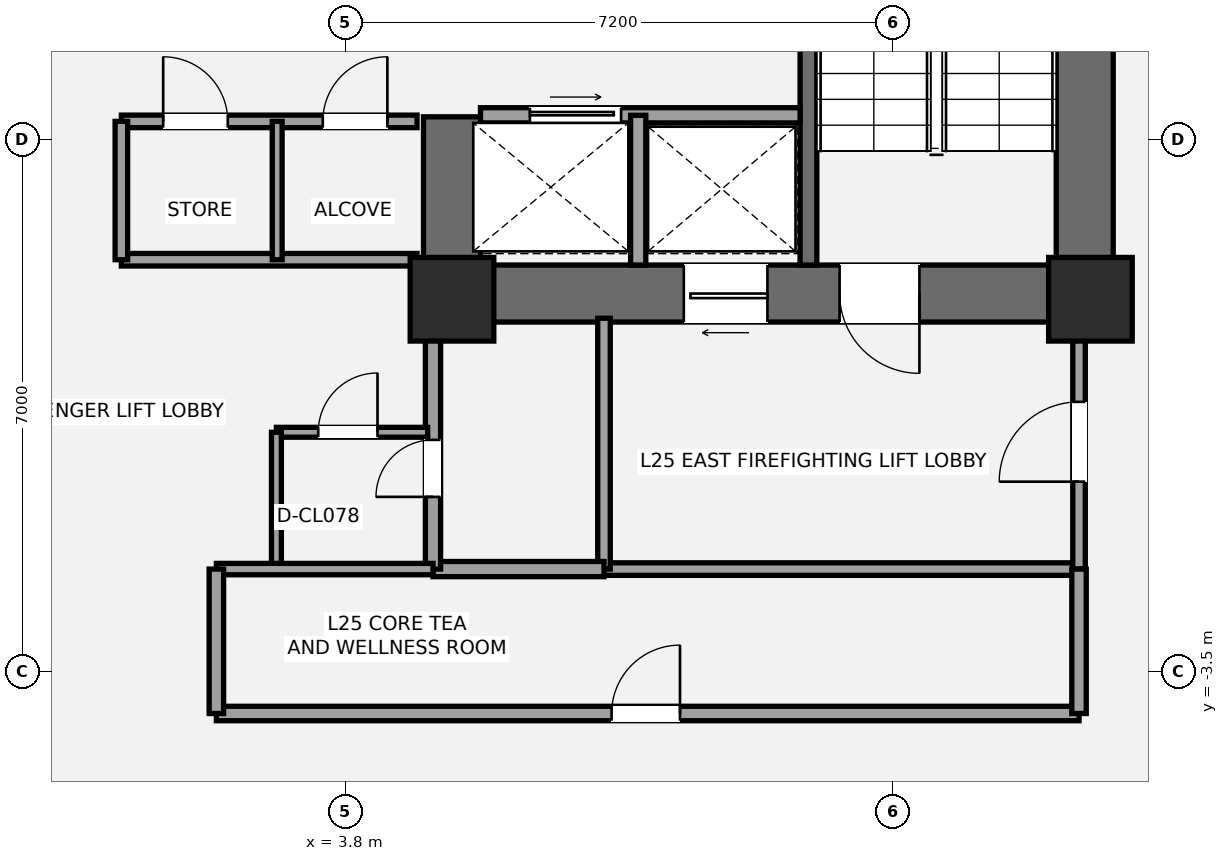
"""IFC4 building model, lengths in metres.
Left out: names, types, materials, properties, quantities, classifications, styles, units other than length and angle.
Written with IfcOpenShell. Run it as: python <this file> out.ifc"""

import sys

from ifc_helpers import new_model, si_unit, direction, frame, frame_2d, origin, origin_2d, place, context, subcontext, project, spatial, rectangle, extrude, element, fill, save


model = new_model("IFC4")
c1 = context("Model", 3, precision=1e-05, world=origin(), true_north=direction((0.0, 1.0)))
c2 = subcontext(c1, "Body", "Model", "MODEL_VIEW")
j1 = project(units=[si_unit("LENGTHUNIT", "METRE"), si_unit("PLANEANGLEUNIT", "RADIAN")], contexts=[c1])
p1 = place(None, origin())
s1 = spatial("IfcSite", under=j1, at=p1, CompositionType="ELEMENT")
p2 = place(p1, origin())
s2 = spatial("IfcBuilding", under=s1, at=p2, CompositionType="ELEMENT")
p3 = place(p2, frame((0.0, 0.0, 96.6)))
s3 = spatial("IfcBuildingStorey", under=s2, at=p3, CompositionType="ELEMENT", Elevation=96.6)
p4 = place(p3, frame((13.525, 1.1, 0.0), z_axis=(0.0, 0.0, 1.0), x_axis=(0.0, 1.0, 0.0)))
e1 = element("IfcWall", 1, at=p4, inside=s3, PredefinedType="SHEAR", context=c2, shape_type="SweptSolid", body=[
    extrude(rectangle(XDim=8.65, YDim=0.75, at=frame_2d((4.325, 0.0))), origin(), (0.0, 0.0, 1.0), 3.5),
])
p5 = place(p3, frame((13.9, 1.475, 0.0), z_axis=(0.0, 0.0, 1.0), x_axis=(-1.0, 0.0, 0.0)))
e2 = element("IfcWall", 2, at=p5, inside=s3, PredefinedType="SHEAR", context=c2, shape_type="SweptSolid", body=[
    extrude(rectangle(XDim=9.075, YDim=0.75, at=frame_2d((4.538, 0.0))), origin(), (0.0, 0.0, 1.0), 3.5),
])
p6 = place(p5, frame((2.55, 0.0, 0.0)))
e3 = element("IfcOpeningElement", 3, at=p6, cuts=e2, PredefinedType="OPENING", context=c2, shape_type="SweptSolid", body=[
    extrude(rectangle(XDim=1.05, YDim=2.15, at=frame_2d((0.525, 1.075))), frame((0.0, 0.385, 0.0), z_axis=(0.0, -1.0, 0.0), x_axis=(1.0, 0.0, 0.0)), (0.0, 0.0, 1.0), 0.77),
])
p7 = place(p5, frame((4.55, 0.0, 0.0)))
e4 = element("IfcOpeningElement", 4, at=p7, cuts=e2, PredefinedType="OPENING", context=c2, shape_type="SweptSolid", body=[
    extrude(rectangle(XDim=1.1, YDim=2.2, at=frame_2d((0.55, 1.1))), frame((0.0, 0.385, 0.0), z_axis=(0.0, -1.0, 0.0), x_axis=(1.0, 0.0, 0.0)), (0.0, 0.0, 1.0), 0.77),
])
p8 = place(p3, frame((5.2, 1.1, 0.0), z_axis=(0.0, 0.0, 1.0), x_axis=(0.0, 1.0, 0.0)))
e5 = element("IfcWall", 5, at=p8, inside=s3, PredefinedType="SHEAR", context=c2, shape_type="SweptSolid", body=[
    extrude(rectangle(XDim=2.7, YDim=0.75, at=frame_2d((1.35, 0.0))), origin(), (0.0, 0.0, 1.0), 3.5),
])
p9 = place(p3, frame((9.89, 1.85, 0.0), z_axis=(0.0, 0.0, 1.0), x_axis=(0.0, 1.0, 0.0)))
e6 = element("IfcWall", 6, at=p9, inside=s3, PredefinedType="SHEAR", context=c2, shape_type="SweptSolid", body=[
    extrude(rectangle(XDim=7.15, YDim=0.22, at=frame_2d((3.575, 0.0))), origin(), (0.0, 0.0, 1.0), 3.5),
])
for number, where, z_axis, x_axis in (
    (7, (5.2, 1.4, 0.0), (0.0, 0.0, 1.0), (1.0, 0.0, 0.0)),
    (8, (13.6, 1.4, 0.0), (0.0, 0.0, 1.0), (1.0, 0.0, 0.0)),
):
    element("IfcColumn", number, at=place(p3, frame(where, z_axis=z_axis, x_axis=x_axis)), inside=s3, PredefinedType="COLUMN", context=c2, shape_type="SweptSolid", body=[
        extrude(rectangle(XDim=1.1, YDim=1.1, at=origin_2d()), origin(), (0.0, 0.0, 1.0), 3.5),
    ])
p10 = place(p3, frame((7.2, -2.15, 0.0), z_axis=(0.0, 0.0, 1.0), x_axis=(1.0, 0.0, 0.0)))
e9 = element("IfcWall", 9, at=p10, inside=s3, PredefinedType="PARTITIONING", context=c2, shape_type="SweptSolid", body=[
    extrude(rectangle(XDim=6.25, YDim=0.165, at=frame_2d((3.125, 0.0))), origin(), (0.0, 0.0, 1.0), 3.31),
])
p11 = place(p3, frame((7.2, -2.15, 0.0), z_axis=(0.0, 0.0, 1.0), x_axis=(0.0, 1.0, 0.0)))
e10 = element("IfcWall", 10, at=p11, inside=s3, PredefinedType="PARTITIONING", context=c2, shape_type="SweptSolid", body=[
    extrude(rectangle(XDim=3.3, YDim=0.165, at=frame_2d((1.65, 0.0))), origin(), (0.0, 0.0, 1.0), 3.31),
])
p12 = place(p3, frame((13.45, -2.15, 0.0), z_axis=(0.0, 0.0, 1.0), x_axis=(0.0, 1.0, 0.0)))
e11 = element("IfcWall", 11, at=p12, inside=s3, PredefinedType="PARTITIONING", context=c2, shape_type="SweptSolid", body=[
    extrude(rectangle(XDim=3.3, YDim=0.165, at=frame_2d((1.65, 0.0))), origin(), (0.0, 0.0, 1.0), 2.763),
])
p13 = place(p12, frame((1.15, 0.0, 0.0)))
e12 = element("IfcOpeningElement", 12, at=p13, cuts=e11, PredefinedType="OPENING", context=c2, shape_type="SweptSolid", body=[
    extrude(rectangle(XDim=1.05, YDim=2.15, at=frame_2d((0.525, 1.075))), frame((0.0, 0.093, 0.0), z_axis=(0.0, -1.0, 0.0), x_axis=(1.0, 0.0, 0.0)), (0.0, 0.0, 1.0), 0.185),
])
p14 = place(p3, frame((4.95, -2.15, 0.0), z_axis=(0.0, 0.0, 1.0), x_axis=(1.0, 0.0, 0.0)))
e13 = element("IfcWall", 13, at=p14, inside=s3, PredefinedType="SOLIDWALL", context=c2, shape_type="SweptSolid", body=[
    extrude(rectangle(XDim=2.25, YDim=0.2, at=frame_2d((1.125, 0.0))), origin(), (0.0, 0.0, 1.0), 2.763),
])
p15 = place(p3, frame((4.95, -2.15, 0.0), z_axis=(0.0, 0.0, 1.0), x_axis=(0.0, 1.0, 0.0)))
e14 = element("IfcWall", 14, at=p15, inside=s3, PredefinedType="SOLIDWALL", context=c2, shape_type="SweptSolid", body=[
    extrude(rectangle(XDim=3.3, YDim=0.2, at=frame_2d((1.65, 0.0))), origin(), (0.0, 0.0, 1.0), 3.31),
])
p16 = place(p15, frame((0.95, 0.0, 0.0)))
e15 = element("IfcOpeningElement", 15, at=p16, cuts=e14, PredefinedType="OPENING", context=c2, shape_type="SweptSolid", body=[
    extrude(rectangle(XDim=0.75, YDim=2.1, at=frame_2d((0.375, 1.05))), frame((0.0, 0.11, 0.0), z_axis=(0.0, -1.0, 0.0), x_axis=(1.0, 0.0, 0.0)), (0.0, 0.0, 1.0), 0.22),
])
p17 = place(p3, frame((2.89, -0.35, 0.0), z_axis=(0.0, 0.0, 1.0), x_axis=(1.0, 0.0, 0.0)))
e16 = element("IfcWall", 16, at=p17, inside=s3, PredefinedType="PARTITIONING", context=c2, shape_type="SweptSolid", body=[
    extrude(rectangle(XDim=1.99, YDim=0.13, at=frame_2d((0.995, 0.0))), origin(), (0.0, 0.0, 1.0), 3.31),
])
p18 = place(p17, frame((0.55, 0.0, 0.0)))
e17 = element("IfcOpeningElement", 17, at=p18, cuts=e16, PredefinedType="OPENING", context=c2, shape_type="SweptSolid", body=[
    extrude(rectangle(XDim=0.78, YDim=2.1, at=frame_2d((0.39, 1.05))), frame((0.0, 0.075, 0.0), z_axis=(0.0, -1.0, 0.0), x_axis=(1.0, 0.0, 0.0)), (0.0, 0.0, 1.0), 0.15),
])
p19 = place(p3, frame((2.89, -2.15, 0.0), z_axis=(0.0, 0.0, 1.0), x_axis=(0.0, 1.0, 0.0)))
e18 = element("IfcWall", 18, at=p19, inside=s3, PredefinedType="PARTITIONING", context=c2, shape_type="SweptSolid", body=[
    extrude(rectangle(XDim=1.8, YDim=0.13, at=frame_2d((0.9, 0.0))), origin(), (0.0, 0.0, 1.0), 3.31),
])
p20 = place(p3, frame((5.575, 3.82, 0.0), z_axis=(0.0, 0.0, 1.0), x_axis=(1.0, 0.0, 0.0)))
e19 = element("IfcWall", 19, at=p20, inside=s3, PredefinedType="SOLIDWALL", context=c2, shape_type="SweptSolid", body=[
    extrude(rectangle(XDim=4.205, YDim=0.2, at=frame_2d((2.103, 0.0))), origin(), (0.0, 0.0, 1.0), 3.31),
])
p21 = place(p20, frame((0.65, 0.0, 0.0)))
e20 = element("IfcOpeningElement", 20, at=p21, cuts=e19, PredefinedType="OPENING", context=c2, shape_type="SweptSolid", body=[
    extrude(rectangle(XDim=1.2, YDim=2.2, at=frame_2d((0.6, 1.1))), frame((0.0, 0.11, 0.0), z_axis=(0.0, -1.0, 0.0), x_axis=(1.0, 0.0, 0.0)), (0.0, 0.0, 1.0), 0.22),
])
p22 = place(p3, frame((7.65, 1.85, 0.0), z_axis=(0.0, 0.0, 1.0), x_axis=(0.0, 1.0, 0.0)))
e21 = element("IfcWall", 21, at=p22, inside=s3, PredefinedType="SOLIDWALL", context=c2, shape_type="SweptSolid", body=[
    extrude(rectangle(XDim=1.97, YDim=0.2, at=frame_2d((0.985, 0.0))), origin(), (0.0, 0.0, 1.0), 3.31),
])
p23 = place(p3, frame((0.85, 1.92, 0.0), z_axis=(0.0, 0.0, 1.0), x_axis=(1.0, 0.0, 0.0)))
e22 = element("IfcWall", 22, at=p23, inside=s3, PredefinedType="PARTITIONING", context=c2, shape_type="SweptSolid", body=[
    extrude(rectangle(XDim=3.89, YDim=0.165, at=frame_2d((1.945, 0.0))), origin(), (0.0, 0.0, 1.0), 2.3),
])
p24 = place(p3, frame((0.85, 3.74, 0.0), z_axis=(0.0, 0.0, 1.0), x_axis=(1.0, 0.0, 0.0)))
e23 = element("IfcWall", 23, at=p24, inside=s3, PredefinedType="PARTITIONING", context=c2, shape_type="SweptSolid", body=[
    extrude(rectangle(XDim=3.89, YDim=0.165, at=frame_2d((1.945, 0.0))), origin(), (0.0, 0.0, 1.0), 3.31),
])
p25 = place(p24, frame((0.55, 0.0, 0.0)))
e24 = element("IfcOpeningElement", 24, at=p25, cuts=e23, PredefinedType="OPENING", context=c2, shape_type="SweptSolid", body=[
    extrude(rectangle(XDim=0.85, YDim=2.1, at=frame_2d((0.425, 1.05))), frame((0.0, 0.093, 0.0), z_axis=(0.0, -1.0, 0.0), x_axis=(1.0, 0.0, 0.0)), (0.0, 0.0, 1.0), 0.185),
])
p26 = place(p24, frame((2.65, 0.0, 0.0)))
e25 = element("IfcOpeningElement", 25, at=p26, cuts=e23, PredefinedType="OPENING", context=c2, shape_type="SweptSolid", body=[
    extrude(rectangle(XDim=0.85, YDim=2.1, at=frame_2d((0.425, 1.05))), frame((0.0, 0.093, 0.0), z_axis=(0.0, -1.0, 0.0), x_axis=(1.0, 0.0, 0.0)), (0.0, 0.0, 1.0), 0.185),
])
p27 = place(p3, frame((0.85, 1.92, 0.0), z_axis=(0.0, 0.0, 1.0), x_axis=(0.0, 1.0, 0.0)))
e26 = element("IfcWall", 26, at=p27, inside=s3, PredefinedType="PARTITIONING", context=c2, shape_type="SweptSolid", body=[
    extrude(rectangle(XDim=1.82, YDim=0.165, at=frame_2d((0.91, 0.0))), origin(), (0.0, 0.0, 1.0), 3.31),
])
p28 = place(p3, frame((2.9, 1.92, 0.0), z_axis=(0.0, 0.0, 1.0), x_axis=(0.0, 1.0, 0.0)))
e27 = element("IfcWall", 27, at=p28, inside=s3, PredefinedType="PARTITIONING", context=c2, shape_type="SweptSolid", body=[
    extrude(rectangle(XDim=1.82, YDim=0.13, at=frame_2d((0.91, 0.0))), origin(), (0.0, 0.0, 1.0), 3.31),
])
p29 = place(p3, frame((2.1, -4.05, 0.0), z_axis=(0.0, 0.0, 1.0), x_axis=(1.0, 0.0, 0.0)))
e28 = element("IfcWall", 28, at=p29, inside=s3, PredefinedType="PLUMBINGWALL", context=c2, shape_type="SweptSolid", body=[
    extrude(rectangle(XDim=11.35, YDim=0.19, at=frame_2d((5.675, 0.0))), origin(), (0.0, 0.0, 1.0), 2.763),
])
p30 = place(p29, frame((5.2, 0.0, 0.0)))
e29 = element("IfcOpeningElement", 29, at=p30, cuts=e28, PredefinedType="OPENING", context=c2, shape_type="SweptSolid", body=[
    extrude(rectangle(XDim=0.9, YDim=2.1, at=frame_2d((0.45, 1.05))), frame((0.0, 0.105, 0.0), z_axis=(0.0, -1.0, 0.0), x_axis=(1.0, 0.0, 0.0)), (0.0, 0.0, 1.0), 0.21),
])
p31 = place(p3, frame((2.1, -2.15, 0.0), z_axis=(0.0, 0.0, 1.0), x_axis=(1.0, 0.0, 0.0)))
e30 = element("IfcWall", 30, at=p31, inside=s3, PredefinedType="PLUMBINGWALL", context=c2, shape_type="SweptSolid", body=[
    extrude(rectangle(XDim=2.85, YDim=0.15, at=frame_2d((1.425, 0.0))), origin(), (0.0, 0.0, 1.0), 2.763),
])
for number, where, z_axis, x_axis in (
    (31, (2.1, -4.05, 0.0), (0.0, 0.0, 1.0), (0.0, 1.0, 0.0)),
    (32, (13.45, -4.05, 0.0), (0.0, 0.0, 1.0), (0.0, 1.0, 0.0)),
):
    element("IfcWall", number, at=place(p3, frame(where, z_axis=z_axis, x_axis=x_axis)), inside=s3, PredefinedType="PLUMBINGWALL", context=c2, shape_type="SweptSolid", body=[
        extrude(rectangle(XDim=1.9, YDim=0.19, at=frame_2d((0.95, 0.0))), origin(), (0.0, 0.0, 1.0), 3.31),
    ])
p32 = place(p6, origin())
e33 = element("IfcDoor", 33, at=p32, inside=s3, OperationType="SINGLE_SWING_LEFT", PredefinedType="DOOR", context=c2, shape_type="SweptSolid", body=[
    extrude(rectangle(XDim=1.05, YDim=2.15, at=frame_2d((0.525, 1.075))), frame((0.0, 0.025, 0.0), z_axis=(0.0, -1.0, 0.0), x_axis=(1.0, 0.0, 0.0)), (0.0, 0.0, 1.0), 0.05),
])
fill(e3, e33)
p33 = place(p13, origin())
e34 = element("IfcDoor", 34, at=p33, inside=s3, OperationType="SINGLE_SWING_LEFT", PredefinedType="DOOR", context=c2, shape_type="SweptSolid", body=[
    extrude(rectangle(XDim=1.05, YDim=2.15, at=frame_2d((0.525, 1.075))), frame((0.0, 0.025, 0.0), z_axis=(0.0, -1.0, 0.0), x_axis=(1.0, 0.0, 0.0)), (0.0, 0.0, 1.0), 0.05),
])
fill(e12, e34)
p34 = place(p16, origin())
e35 = element("IfcDoor", 35, at=p34, inside=s3, OperationType="SINGLE_SWING_LEFT", PredefinedType="DOOR", context=c2, shape_type="SweptSolid", body=[
    extrude(rectangle(XDim=0.75, YDim=2.1, at=frame_2d((0.375, 1.05))), frame((0.0, 0.025, 0.0), z_axis=(0.0, -1.0, 0.0), x_axis=(1.0, 0.0, 0.0)), (0.0, 0.0, 1.0), 0.05),
])
fill(e15, e35)
p35 = place(p18, origin())
e36 = element("IfcDoor", 36, at=p35, inside=s3, OperationType="SINGLE_SWING_RIGHT", PredefinedType="DOOR", context=c2, shape_type="SweptSolid", body=[
    extrude(rectangle(XDim=0.78, YDim=2.1, at=frame_2d((0.39, 1.05))), frame((0.0, 0.025, 0.0), z_axis=(0.0, -1.0, 0.0), x_axis=(1.0, 0.0, 0.0)), (0.0, 0.0, 1.0), 0.05),
])
fill(e17, e36)
p36 = place(p7, origin())
e37 = element("IfcDoor", 37, at=p36, inside=s3, OperationType="SLIDING_TO_LEFT", PredefinedType="DOOR", context=c2, shape_type="SweptSolid", body=[
    extrude(rectangle(XDim=1.1, YDim=2.2, at=frame_2d((0.55, 1.1))), frame((0.0, 0.025, 0.0), z_axis=(0.0, -1.0, 0.0), x_axis=(1.0, 0.0, 0.0)), (0.0, 0.0, 1.0), 0.05),
])
fill(e4, e37)
p37 = place(p21, origin())
e38 = element("IfcDoor", 38, at=p37, inside=s3, OperationType="SLIDING_TO_RIGHT", PredefinedType="DOOR", context=c2, shape_type="SweptSolid", body=[
    extrude(rectangle(XDim=1.2, YDim=2.2, at=frame_2d((0.6, 1.1))), frame((0.0, 0.025, 0.0), z_axis=(0.0, -1.0, 0.0), x_axis=(1.0, 0.0, 0.0)), (0.0, 0.0, 1.0), 0.05),
])
fill(e20, e38)
p38 = place(p25, origin())
e39 = element("IfcDoor", 39, at=p38, inside=s3, OperationType="SINGLE_SWING_LEFT", PredefinedType="DOOR", context=c2, shape_type="SweptSolid", body=[
    extrude(rectangle(XDim=0.85, YDim=2.1, at=frame_2d((0.425, 1.05))), frame((0.0, 0.025, 0.0), z_axis=(0.0, -1.0, 0.0), x_axis=(1.0, 0.0, 0.0)), (0.0, 0.0, 1.0), 0.05),
])
fill(e24, e39)
p39 = place(p26, origin())
e40 = element("IfcDoor", 40, at=p39, inside=s3, OperationType="SINGLE_SWING_RIGHT", PredefinedType="DOOR", context=c2, shape_type="SweptSolid", body=[
    extrude(rectangle(XDim=0.85, YDim=2.1, at=frame_2d((0.425, 1.05))), frame((0.0, 0.025, 0.0), z_axis=(0.0, -1.0, 0.0), x_axis=(1.0, 0.0, 0.0)), (0.0, 0.0, 1.0), 0.05),
])
fill(e25, e40)
p40 = place(p30, origin())
e41 = element("IfcDoor", 41, at=p40, inside=s3, OperationType="SINGLE_SWING_RIGHT", PredefinedType="DOOR", context=c2, shape_type="SweptSolid", body=[
    extrude(rectangle(XDim=0.9, YDim=2.1, at=frame_2d((0.45, 1.05))), frame((0.0, 0.025, 0.0), z_axis=(0.0, -1.0, 0.0), x_axis=(1.0, 0.0, 0.0)), (0.0, 0.0, 1.0), 0.05),
])
fill(e29, e41)
save(model, sys.argv[1])
